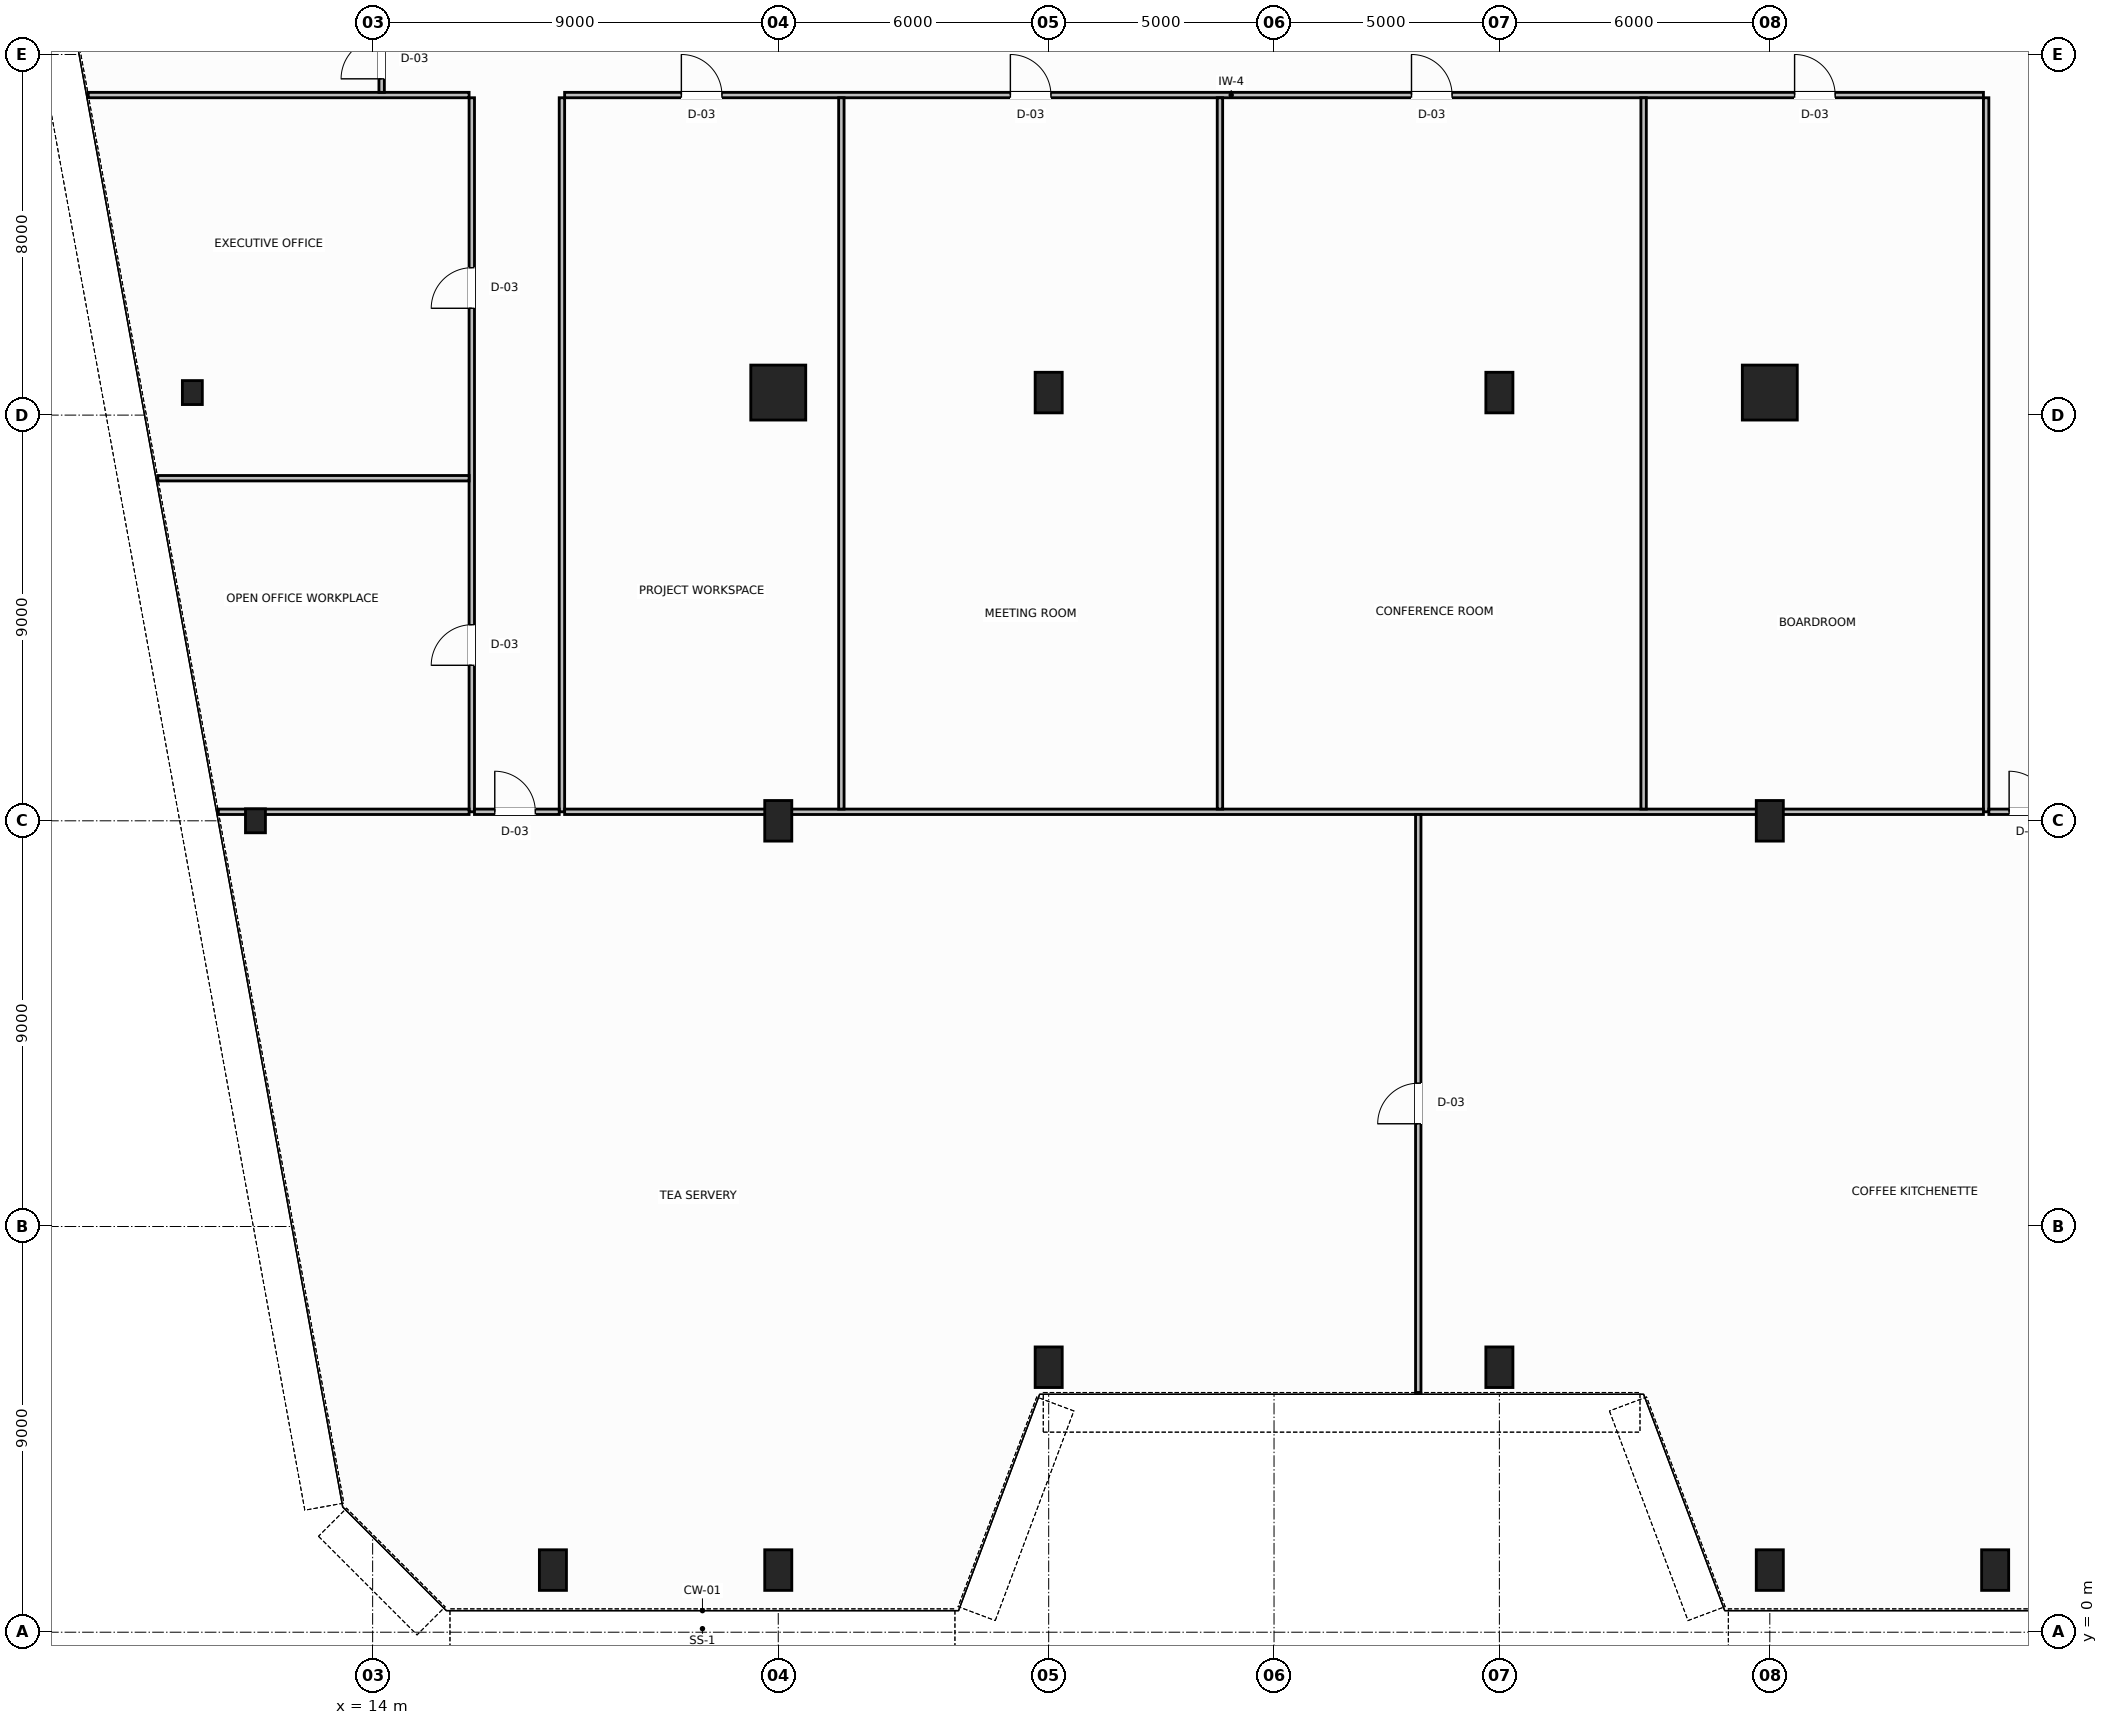
"""IFC4 building model, lengths in metres.
Left out: names, types, materials, properties, quantities, classifications, styles, units other than length and angle.
Written with IfcOpenShell. Run it as: python <this file> out.ifc"""

import sys

from ifc_helpers import new_model, si_unit, direction, frame, frame_2d, origin, origin_2d, place, context, subcontext, project, spatial, rectangle, hollow_rectangle, hollow_circle, i_section, extrude, source, transform, mapped, element, fill, save


model = new_model("IFC4")
c1 = context("Model", 3, precision=1e-05, world=origin(), true_north=direction((0.0, 1.0)))
c2 = subcontext(c1, "Body", "Model", "MODEL_VIEW")
j1 = project(units=[si_unit("LENGTHUNIT", "METRE"), si_unit("PLANEANGLEUNIT", "RADIAN")], contexts=[c1])
p1 = place(None, origin())
s1 = spatial("IfcSite", under=j1, at=p1, CompositionType="ELEMENT")
p2 = place(p1, origin())
s2 = spatial("IfcBuilding", under=s1, at=p2, CompositionType="ELEMENT")
p3 = place(p2, frame((0.0, 0.0, 26.4)))
s3 = spatial("IfcBuildingStorey", under=s2, at=p3, CompositionType="ELEMENT", Elevation=26.4)
m1 = source(origin(), c2, "Body", "SweptSolid", [
    extrude(i_section(OverallWidth=0.442, OverallDepth=0.531, WebThickness=0.065, FlangeThickness=0.076, FilletRadius=0.015, at=origin_2d()), origin(), (0.0, 0.0, 1.0), 3.8),
])
for number, where, z_axis, x_axis in (
    (1, (10.0, 27.5, 0.0), (0.0, 0.0, 1.0), (1.0, 0.0, 0.0)),
    (2, (11.4, 18.0, 0.0), (0.0, 0.0, 1.0), (1.0, 0.0, 0.0)),
):
    element("IfcColumn", number, at=place(p3, frame(where, z_axis=z_axis, x_axis=x_axis)), inside=s3, PredefinedType="COLUMN", context=c2, shape_type="MappedRepresentation", body=[
        mapped(m1, transform((0.0, 0.0, 0.0), scale=1.0)),
    ])
m2 = source(origin(), c2, "Body", "SweptSolid", [
    extrude(hollow_circle(Radius=0.61, WallThickness=0.05, at=origin_2d()), origin(), (0.0, 0.0, 1.0), 3.8),
])
p4 = place(p3, frame((23.0, 27.5, 0.0), z_axis=(0.0, 0.0, 1.0), x_axis=(1.0, 0.0, 0.0)))
e3 = element("IfcColumn", 3, at=p4, inside=s3, PredefinedType="COLUMN", context=c2, shape_type="MappedRepresentation", body=[
    mapped(m2, transform((0.0, 0.0, 0.0), scale=1.0)),
])
m3 = source(origin(), c2, "Body", "SweptSolid", [
    extrude(hollow_rectangle(XDim=0.6, YDim=0.9, WallThickness=0.04, InnerFilletRadius=0.04, OuterFilletRadius=0.08, at=origin_2d()), origin(), (0.0, 0.0, 1.0), 3.8),
])
for number, where, z_axis, x_axis in (
    (4, (29.0, 27.5, 0.0), (0.0, 0.0, 1.0), (1.0, 0.0, 0.0)),
    (5, (39.0, 27.5, 0.0), (0.0, 0.0, 1.0), (1.0, 0.0, 0.0)),
):
    element("IfcColumn", number, at=place(p3, frame(where, z_axis=z_axis, x_axis=x_axis)), inside=s3, PredefinedType="COLUMN", context=c2, shape_type="MappedRepresentation", body=[
        mapped(m3, transform((0.0, 0.0, 0.0), scale=1.0)),
    ])
p5 = place(p3, frame((45.0, 27.5, 0.0), z_axis=(0.0, 0.0, 1.0), x_axis=(1.0, 0.0, 0.0)))
e6 = element("IfcColumn", 6, at=p5, inside=s3, PredefinedType="COLUMN", context=c2, shape_type="MappedRepresentation", body=[
    mapped(m2, transform((0.0, 0.0, 0.0), scale=1.0)),
])
for number, where, z_axis, x_axis in (
    (7, (23.0, 18.0, 0.0), (0.0, 0.0, 1.0), (1.0, 0.0, 0.0)),
    (8, (45.0, 18.0, 0.0), (0.0, 0.0, 1.0), (1.0, 0.0, 0.0)),
):
    element("IfcColumn", number, at=place(p3, frame(where, z_axis=z_axis, x_axis=x_axis)), inside=s3, PredefinedType="COLUMN", context=c2, shape_type="MappedRepresentation", body=[
        mapped(m3, transform((0.0, 0.0, 0.0), scale=1.0)),
    ])
m4 = source(origin(), c2, "Body", "SweptSolid", [
    extrude(hollow_rectangle(XDim=0.6, YDim=0.9, WallThickness=0.04, InnerFilletRadius=0.04, OuterFilletRadius=0.08, at=origin_2d()), origin(), (0.0, 0.0, 1.0), 3.744),
])
for number, where, z_axis, x_axis in (
    (9, (18.0, 1.378, 0.032), (0.0, 0.064, 0.998), (-1.0, 0.0, 0.0)),
    (10, (23.0, 1.378, 0.032), (0.0, 0.064, 0.998), (-1.0, 0.0, 0.0)),
    (11, (29.0, 5.878, 0.032), (0.0, 0.064, 0.998), (-1.0, 0.0, 0.0)),
    (12, (39.0, 5.878, 0.032), (0.0, 0.064, 0.998), (-1.0, 0.0, 0.0)),
    (13, (45.0, 1.378, 0.032), (0.0, 0.064, 0.998), (-1.0, 0.0, 0.0)),
    (14, (50.0, 1.378, 0.032), (0.0, 0.064, 0.998), (-1.0, 0.0, 0.0)),
):
    element("IfcColumn", number, at=place(p3, frame(where, z_axis=z_axis, x_axis=x_axis)), inside=s3, PredefinedType="COLUMN", context=c2, shape_type="MappedRepresentation", body=[
        mapped(m4, transform((0.0, 0.0, 0.0), scale=1.0)),
    ])
p6 = place(p3, frame((18.26, 34.1, 0.0), z_axis=(0.0, 0.0, 1.0), x_axis=(1.0, 0.0, 0.0)))
e15 = element("IfcWall", 15, at=p6, inside=s3, PredefinedType="PARTITIONING", context=c2, shape_type="SweptSolid", body=[
    extrude(rectangle(XDim=31.48, YDim=0.12, at=frame_2d((15.74, 0.0))), origin(), (0.0, 0.0, 1.0), 3.58),
])
p7 = place(p6, frame((2.59, 0.0, 0.0)))
e16 = element("IfcOpeningElement", 16, at=p7, cuts=e15, PredefinedType="OPENING", context=c2, shape_type="SweptSolid", body=[
    extrude(rectangle(XDim=0.9, YDim=2.15, at=frame_2d((0.45, 1.075))), frame((0.0, 0.07, 0.0), z_axis=(0.0, -1.0, 0.0), x_axis=(1.0, 0.0, 0.0)), (0.0, 0.0, 1.0), 0.14),
])
p8 = place(p6, frame((9.89, 0.0, 0.0)))
e17 = element("IfcOpeningElement", 17, at=p8, cuts=e15, PredefinedType="OPENING", context=c2, shape_type="SweptSolid", body=[
    extrude(rectangle(XDim=0.9, YDim=2.15, at=frame_2d((0.45, 1.075))), frame((0.0, 0.07, 0.0), z_axis=(0.0, -1.0, 0.0), x_axis=(1.0, 0.0, 0.0)), (0.0, 0.0, 1.0), 0.14),
])
p9 = place(p6, frame((18.79, 0.0, 0.0)))
e18 = element("IfcOpeningElement", 18, at=p9, cuts=e15, PredefinedType="OPENING", context=c2, shape_type="SweptSolid", body=[
    extrude(rectangle(XDim=0.9, YDim=2.15, at=frame_2d((0.45, 1.075))), frame((0.0, 0.07, 0.0), z_axis=(0.0, -1.0, 0.0), x_axis=(1.0, 0.0, 0.0)), (0.0, 0.0, 1.0), 0.14),
])
p10 = place(p6, frame((27.29, 0.0, 0.0)))
e19 = element("IfcOpeningElement", 19, at=p10, cuts=e15, PredefinedType="OPENING", context=c2, shape_type="SweptSolid", body=[
    extrude(rectangle(XDim=0.9, YDim=2.15, at=frame_2d((0.45, 1.075))), frame((0.0, 0.07, 0.0), z_axis=(0.0, -1.0, 0.0), x_axis=(1.0, 0.0, 0.0)), (0.0, 0.0, 1.0), 0.14),
])
p11 = place(p3, frame((7.69, 34.1, 0.0), z_axis=(0.0, 0.0, 1.0), x_axis=(1.0, 0.0, 0.0)))
e20 = element("IfcWall", 20, at=p11, inside=s3, PredefinedType="PARTITIONING", context=c2, shape_type="SweptSolid", body=[
    extrude(rectangle(XDim=8.45, YDim=0.12, at=frame_2d((4.225, 0.0))), origin(), (0.0, 0.0, 1.0), 3.58),
])
p12 = place(p3, frame((14.2, 34.16, 0.0), z_axis=(0.0, 0.0, 1.0), x_axis=(0.0, 1.0, 0.0)))
e21 = element("IfcWall", 21, at=p12, inside=s3, PredefinedType="PARTITIONING", context=c2, shape_type="SweptSolid", body=[
    extrude(rectangle(XDim=2.28, YDim=0.12, at=frame_2d((1.14, 0.0))), origin(), (0.0, 0.0, 1.0), 3.58),
])
p13 = place(p12, frame((0.3, 0.0, 0.0)))
e22 = element("IfcOpeningElement", 22, at=p13, cuts=e21, PredefinedType="OPENING", context=c2, shape_type="SweptSolid", body=[
    extrude(rectangle(XDim=0.9, YDim=2.15, at=frame_2d((0.45, 1.075))), frame((0.0, 0.07, 0.0), z_axis=(0.0, -1.0, 0.0), x_axis=(1.0, 0.0, 0.0)), (0.0, 0.0, 1.0), 0.14),
])
p14 = place(p3, frame((16.2, 18.2, 0.0), z_axis=(0.0, 0.0, 1.0), x_axis=(0.0, 1.0, 0.0)))
e23 = element("IfcWall", 23, at=p14, inside=s3, PredefinedType="PARTITIONING", context=c2, shape_type="SweptSolid", body=[
    extrude(rectangle(XDim=15.84, YDim=0.12, at=frame_2d((7.92, 0.0))), origin(), (0.0, 0.0, 1.0), 3.58),
])
p15 = place(p14, frame((3.25, 0.0, 0.0)))
e24 = element("IfcOpeningElement", 24, at=p15, cuts=e23, PredefinedType="OPENING", context=c2, shape_type="SweptSolid", body=[
    extrude(rectangle(XDim=0.9, YDim=2.15, at=frame_2d((0.45, 1.075))), frame((0.0, 0.07, 0.0), z_axis=(0.0, -1.0, 0.0), x_axis=(1.0, 0.0, 0.0)), (0.0, 0.0, 1.0), 0.14),
])
p16 = place(p14, frame((11.17, 0.0, 0.0)))
e25 = element("IfcOpeningElement", 25, at=p16, cuts=e23, PredefinedType="OPENING", context=c2, shape_type="SweptSolid", body=[
    extrude(rectangle(XDim=0.9, YDim=2.15, at=frame_2d((0.45, 1.075))), frame((0.0, 0.07, 0.0), z_axis=(0.0, -1.0, 0.0), x_axis=(1.0, 0.0, 0.0)), (0.0, 0.0, 1.0), 0.14),
])
for number, where, z_axis, x_axis in (
    (26, (18.2, 18.2, 0.0), (0.0, 0.0, 1.0), (0.0, 1.0, 0.0)),
    (27, (49.8, 18.2, 0.0), (0.0, 0.0, 1.0), (0.0, 1.0, 0.0)),
):
    element("IfcWall", number, at=place(p3, frame(where, z_axis=z_axis, x_axis=x_axis)), inside=s3, PredefinedType="PARTITIONING", context=c2, shape_type="SweptSolid", body=[
        extrude(rectangle(XDim=15.84, YDim=0.12, at=frame_2d((7.92, 0.0))), origin(), (0.0, 0.0, 1.0), 3.58),
    ])
p17 = place(p3, frame((16.26, 18.2, 0.0), z_axis=(0.0, 0.0, 1.0), x_axis=(1.0, 0.0, 0.0)))
e28 = element("IfcWall", 28, at=p17, inside=s3, PredefinedType="PARTITIONING", context=c2, shape_type="SweptSolid", body=[
    extrude(rectangle(XDim=1.88, YDim=0.12, at=frame_2d((0.94, 0.0))), origin(), (0.0, 0.0, 1.0), 2.77),
])
p18 = place(p17, frame((0.45, 0.0, 0.0)))
e29 = element("IfcOpeningElement", 29, at=p18, cuts=e28, PredefinedType="OPENING", context=c2, shape_type="SweptSolid", body=[
    extrude(rectangle(XDim=0.9, YDim=2.15, at=frame_2d((0.45, 1.075))), frame((0.0, 0.07, 0.0), z_axis=(0.0, -1.0, 0.0), x_axis=(1.0, 0.0, 0.0)), (0.0, 0.0, 1.0), 0.14),
])
p19 = place(p3, frame((49.86, 18.2, 0.0), z_axis=(0.0, 0.0, 1.0), x_axis=(1.0, 0.0, 0.0)))
e30 = element("IfcWall", 30, at=p19, inside=s3, PredefinedType="PARTITIONING", context=c2, shape_type="SweptSolid", body=[
    extrude(rectangle(XDim=1.88, YDim=0.12, at=frame_2d((0.94, 0.0))), origin(), (0.0, 0.0, 1.0), 2.77),
])
p20 = place(p19, frame((0.45, 0.0, 0.0)))
e31 = element("IfcOpeningElement", 31, at=p20, cuts=e30, PredefinedType="OPENING", context=c2, shape_type="SweptSolid", body=[
    extrude(rectangle(XDim=0.9, YDim=2.15, at=frame_2d((0.45, 1.075))), frame((0.0, 0.07, 0.0), z_axis=(0.0, -1.0, 0.0), x_axis=(1.0, 0.0, 0.0)), (0.0, 0.0, 1.0), 0.14),
])
p21 = place(p3, frame((10.577, 18.2, 0.0), z_axis=(0.0, 0.0, 1.0), x_axis=(1.0, 0.0, 0.0)))
e32 = element("IfcWall", 32, at=p21, inside=s3, PredefinedType="PARTITIONING", context=c2, shape_type="SweptSolid", body=[
    extrude(rectangle(XDim=5.563, YDim=0.12, at=frame_2d((2.782, 0.0))), origin(), (0.0, 0.0, 1.0), 2.77),
])
p22 = place(p3, frame((9.233, 25.6, 0.0), z_axis=(0.0, 0.0, 1.0), x_axis=(1.0, 0.0, 0.0)))
e33 = element("IfcWall", 33, at=p22, inside=s3, PredefinedType="PARTITIONING", context=c2, shape_type="SweptSolid", body=[
    extrude(rectangle(XDim=6.906, YDim=0.12, at=frame_2d((3.453, 0.0))), origin(), (0.0, 0.0, 1.0), 3.58),
])
p23 = place(p3, frame((18.26, 18.2, 0.0), z_axis=(0.0, 0.0, 1.0), x_axis=(1.0, 0.0, 0.0)))
e34 = element("IfcWall", 34, at=p23, inside=s3, PredefinedType="PARTITIONING", context=c2, shape_type="SweptSolid", body=[
    extrude(rectangle(XDim=31.48, YDim=0.12, at=frame_2d((15.74, 0.0))), origin(), (0.0, 0.0, 1.0), 2.77),
])
for number, where, z_axis, x_axis in (
    (35, (24.4, 18.26, 0.0), (0.0, 0.0, 1.0), (0.0, 1.0, 0.0)),
    (36, (32.8, 18.26, 0.0), (0.0, 0.0, 1.0), (0.0, 1.0, 0.0)),
    (37, (42.2, 18.26, 0.0), (0.0, 0.0, 1.0), (0.0, 1.0, 0.0)),
):
    element("IfcWall", number, at=place(p3, frame(where, z_axis=z_axis, x_axis=x_axis)), inside=s3, PredefinedType="PARTITIONING", context=c2, shape_type="SweptSolid", body=[
        extrude(rectangle(XDim=15.78, YDim=0.12, at=frame_2d((7.89, 0.0))), origin(), (0.0, 0.0, 1.0), 3.58),
    ])
p24 = place(p3, frame((37.2, 5.318, 0.0), z_axis=(0.0, 0.0, 1.0), x_axis=(0.0, 1.0, 0.0)))
e38 = element("IfcWall", 38, at=p24, inside=s3, PredefinedType="PARTITIONING", context=c2, shape_type="SweptSolid", body=[
    extrude(rectangle(XDim=12.822, YDim=0.12, at=frame_2d((6.411, 0.0))), origin(), (0.0, 0.0, 1.0), 3.58),
])
p25 = place(p24, frame((5.961, 0.0, 0.0)))
e39 = element("IfcOpeningElement", 39, at=p25, cuts=e38, PredefinedType="OPENING", context=c2, shape_type="SweptSolid", body=[
    extrude(rectangle(XDim=0.9, YDim=2.15, at=frame_2d((0.45, 1.075))), frame((0.0, 0.07, 0.0), z_axis=(0.0, -1.0, 0.0), x_axis=(1.0, 0.0, 0.0)), (0.0, 0.0, 1.0), 0.14),
])
m5 = source(origin(), c2, "Body", "SweptSolid", [
    extrude(rectangle(XDim=0.9, YDim=2.15, at=frame_2d((0.45, 1.075))), frame((0.0, 0.025, 0.0), z_axis=(0.0, -1.0, 0.0), x_axis=(1.0, 0.0, 0.0)), (0.0, 0.0, 1.0), 0.05),
])
p26 = place(p13, origin())
e40 = element("IfcDoor", 40, at=p26, inside=s3, OperationType="SINGLE_SWING_LEFT", PredefinedType="DOOR", context=c2, shape_type="MappedRepresentation", body=[
    mapped(m5, transform((0.0, 0.0, 0.0), scale=1.0)),
])
fill(e22, e40)
p27 = place(p15, origin())
e41 = element("IfcDoor", 41, at=p27, inside=s3, OperationType="SINGLE_SWING_LEFT", PredefinedType="DOOR", context=c2, shape_type="MappedRepresentation", body=[
    mapped(m5, transform((0.0, 0.0, 0.0), scale=1.0)),
])
fill(e24, e41)
p28 = place(p16, origin())
e42 = element("IfcDoor", 42, at=p28, inside=s3, OperationType="SINGLE_SWING_RIGHT", PredefinedType="DOOR", context=c2, shape_type="MappedRepresentation", body=[
    mapped(m5, transform((0.0, 0.0, 0.0), scale=1.0)),
])
fill(e25, e42)
p29 = place(p7, origin())
e43 = element("IfcDoor", 43, at=p29, inside=s3, OperationType="SINGLE_SWING_LEFT", PredefinedType="DOOR", context=c2, shape_type="MappedRepresentation", body=[
    mapped(m5, transform((0.0, 0.0, 0.0), scale=1.0)),
])
fill(e16, e43)
p30 = place(p8, origin())
e44 = element("IfcDoor", 44, at=p30, inside=s3, OperationType="SINGLE_SWING_RIGHT", PredefinedType="DOOR", context=c2, shape_type="MappedRepresentation", body=[
    mapped(m5, transform((0.0, 0.0, 0.0), scale=1.0)),
])
fill(e17, e44)
p31 = place(p9, origin())
e45 = element("IfcDoor", 45, at=p31, inside=s3, OperationType="SINGLE_SWING_LEFT", PredefinedType="DOOR", context=c2, shape_type="MappedRepresentation", body=[
    mapped(m5, transform((0.0, 0.0, 0.0), scale=1.0)),
])
fill(e18, e45)
p32 = place(p10, origin())
e46 = element("IfcDoor", 46, at=p32, inside=s3, OperationType="SINGLE_SWING_RIGHT", PredefinedType="DOOR", context=c2, shape_type="MappedRepresentation", body=[
    mapped(m5, transform((0.0, 0.0, 0.0), scale=1.0)),
])
fill(e19, e46)
p33 = place(p18, origin())
e47 = element("IfcDoor", 47, at=p33, inside=s3, OperationType="SINGLE_SWING_LEFT", PredefinedType="DOOR", context=c2, shape_type="MappedRepresentation", body=[
    mapped(m5, transform((0.0, 0.0, 0.0), scale=1.0)),
])
fill(e29, e47)
p34 = place(p25, origin())
e48 = element("IfcDoor", 48, at=p34, inside=s3, OperationType="SINGLE_SWING_RIGHT", PredefinedType="DOOR", context=c2, shape_type="MappedRepresentation", body=[
    mapped(m5, transform((0.0, 0.0, 0.0), scale=1.0)),
])
fill(e39, e48)
p35 = place(p20, origin())
e49 = element("IfcDoor", 49, at=p35, inside=s3, OperationType="SINGLE_SWING_RIGHT", PredefinedType="DOOR", context=c2, shape_type="MappedRepresentation", body=[
    mapped(m5, transform((0.0, 0.0, 0.0), scale=1.0)),
])
fill(e31, e49)
save(model, sys.argv[1])
